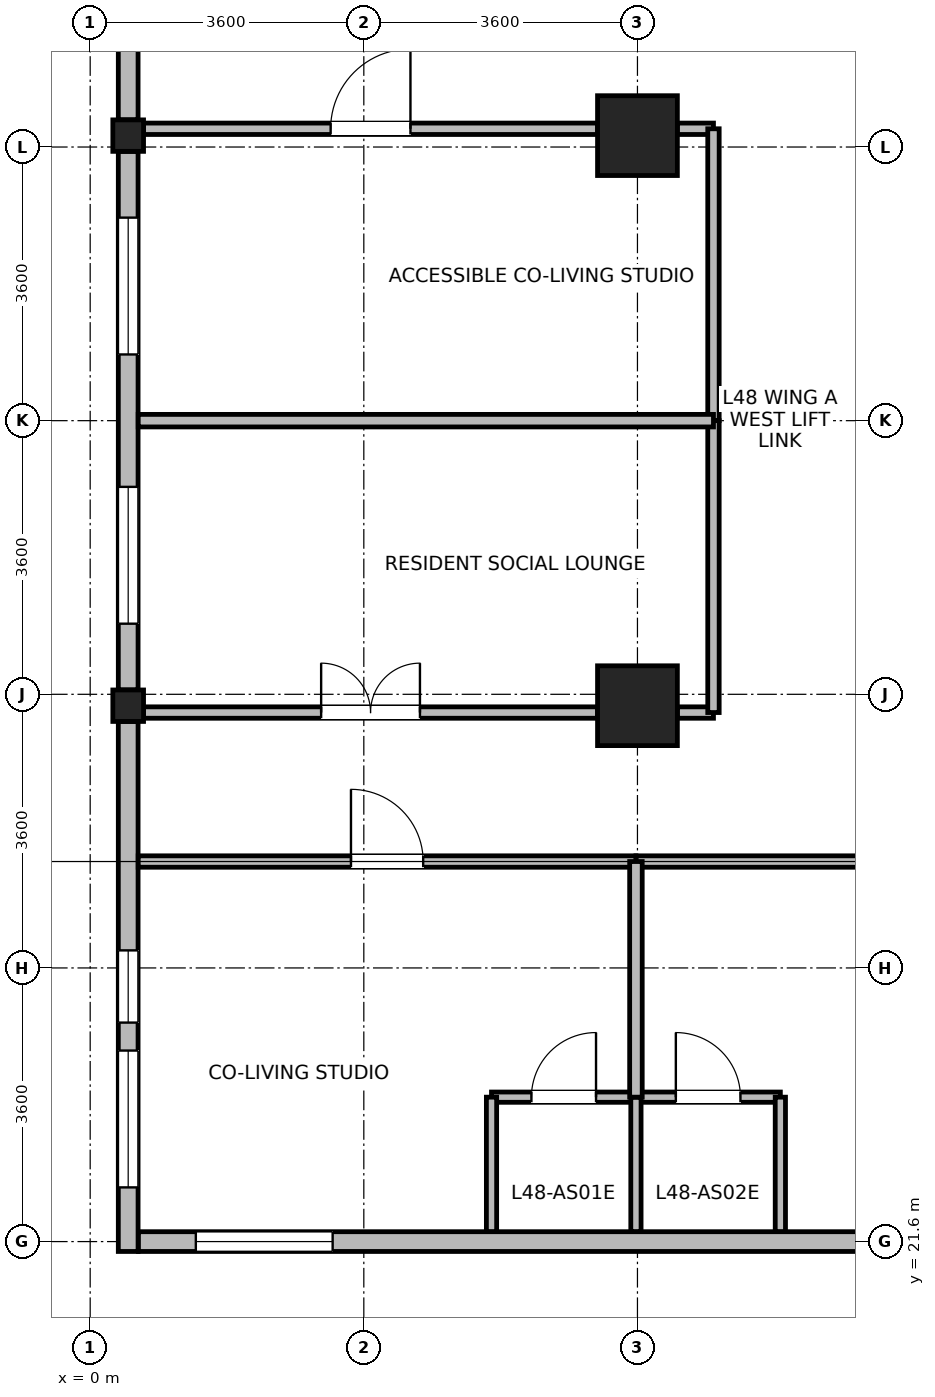
"""IFC4 building model, lengths in metres.
Left out: names, types, materials, properties, quantities, classifications, styles, units other than length and angle.
Written with IfcOpenShell. Run it as: python <this file> out.ifc"""

import sys

from ifc_helpers import new_model, si_unit, direction, frame, frame_2d, origin, origin_2d, place, context, subcontext, project, spatial, rectangle, i_section, extrude, source, transform, mapped, element, fill, save


model = new_model("IFC4")
c1 = context("Model", 3, precision=1e-05, world=origin(), true_north=direction((0.0, 1.0)))
c2 = subcontext(c1, "Body", "Model", "MODEL_VIEW")
j1 = project(units=[si_unit("LENGTHUNIT", "METRE"), si_unit("PLANEANGLEUNIT", "RADIAN")], contexts=[c1])
p1 = place(None, origin())
s1 = spatial("IfcSite", under=j1, at=p1, CompositionType="ELEMENT")
p2 = place(p1, origin())
s2 = spatial("IfcBuilding", under=s1, at=p2, CompositionType="ELEMENT")
p3 = place(p2, frame((0.0, 0.0, 188.3)))
s3 = spatial("IfcBuildingStorey", under=s2, at=p3, CompositionType="ELEMENT", Elevation=188.3)
m1 = source(origin(), c2, "Body", "SweptSolid", [
    extrude(rectangle(XDim=1.05, YDim=1.05, at=origin_2d()), origin(), (0.0, 0.0, 1.0), 3.7),
])
for number, where, z_axis, x_axis in (
    (1, (7.2, 28.65, 0.0), (0.0, 0.0, 1.0), (1.0, 0.0, 0.0)),
    (2, (7.2, 36.15, 0.0), (0.0, 0.0, 1.0), (1.0, 0.0, 0.0)),
):
    element("IfcColumn", number, at=place(p3, frame(where, z_axis=z_axis, x_axis=x_axis)), inside=s3, PredefinedType="COLUMN", context=c2, shape_type="MappedRepresentation", body=[
        mapped(m1, transform((0.0, 0.0, 0.0), x_axis=(1.0, 0.0, 0.0), y_axis=(0.0, 1.0, 0.0), z_axis=(0.0, 0.0, 1.0), scale=1.0)),
    ])
m2 = source(origin(), c2, "Body", "SweptSolid", [
    extrude(i_section(OverallWidth=0.404, OverallDepth=0.414, WebThickness=0.021, FlangeThickness=0.028, FilletRadius=0.015, at=origin_2d()), origin(), (0.0, 0.0, 1.0), 3.7),
])
for number, where, z_axis, x_axis in (
    (3, (0.5, 28.65, 0.0), (0.0, 0.0, 1.0), (1.0, 0.0, 0.0)),
    (4, (0.5, 36.15, 0.0), (0.0, 0.0, 1.0), (1.0, 0.0, 0.0)),
):
    element("IfcColumn", number, at=place(p3, frame(where, z_axis=z_axis, x_axis=x_axis)), inside=s3, PredefinedType="COLUMN", context=c2, shape_type="MappedRepresentation", body=[
        mapped(m2, transform((0.0, 0.0, 0.0), x_axis=(1.0, 0.0, 0.0), y_axis=(0.0, 1.0, 0.0), z_axis=(0.0, 0.0, 1.0), scale=1.0)),
    ])
p4 = place(p3, frame((0.5, 36.358, 0.0), z_axis=(0.0, 0.0, 1.0), x_axis=(0.0, 1.0, 0.0)))
e5 = element("IfcWall", 5, at=p4, inside=s3, PredefinedType="STANDARD", context=c2, shape_type="SweptSolid", body=[
    extrude(rectangle(XDim=6.972, YDim=0.26, at=frame_2d((3.486, 0.0))), origin(), (0.0, 0.0, 1.0), 3.32),
])
p5 = place(p4, frame((4.329, 0.0, 0.85)))
e6 = element("IfcOpeningElement", 6, at=p5, cuts=e5, PredefinedType="OPENING", context=c2, shape_type="SweptSolid", body=[
    extrude(rectangle(XDim=1.8, YDim=1.85, at=frame_2d((0.9, 0.925))), frame((0.0, 0.14, 0.0), z_axis=(0.0, -1.0, 0.0), x_axis=(1.0, 0.0, 0.0)), (0.0, 0.0, 1.0), 0.28),
])
p6 = place(p4, frame((3.011, 0.0, 0.85)))
e7 = element("IfcOpeningElement", 7, at=p6, cuts=e5, PredefinedType="OPENING", context=c2, shape_type="SweptSolid", body=[
    extrude(rectangle(XDim=0.95, YDim=1.75, at=frame_2d((0.475, 0.875))), frame((0.0, 0.14, 0.0), z_axis=(0.0, -1.0, 0.0), x_axis=(1.0, 0.0, 0.0)), (0.0, 0.0, 1.0), 0.28),
])
p7 = place(p3, frame((0.5, 28.858, 0.0), z_axis=(0.0, 0.0, 1.0), x_axis=(0.0, 1.0, 0.0)))
e8 = element("IfcWall", 8, at=p7, inside=s3, PredefinedType="STANDARD", context=c2, shape_type="SweptSolid", body=[
    extrude(rectangle(XDim=7.084, YDim=0.26, at=frame_2d((3.542, 0.0))), origin(), (0.0, 0.0, 1.0), 2.87),
])
p8 = place(p7, frame((0.871, 0.0, 0.85)))
e9 = element("IfcOpeningElement", 9, at=p8, cuts=e8, PredefinedType="OPENING", context=c2, shape_type="SweptSolid", body=[
    extrude(rectangle(XDim=1.8, YDim=1.85, at=frame_2d((0.9, 0.925))), frame((0.0, 0.14, 0.0), z_axis=(0.0, -1.0, 0.0), x_axis=(1.0, 0.0, 0.0)), (0.0, 0.0, 1.0), 0.28),
])
p9 = place(p7, frame((4.413, 0.0, 0.85)))
e10 = element("IfcOpeningElement", 10, at=p9, cuts=e8, PredefinedType="OPENING", context=c2, shape_type="SweptSolid", body=[
    extrude(rectangle(XDim=1.8, YDim=1.85, at=frame_2d((0.9, 0.925))), frame((0.0, 0.14, 0.0), z_axis=(0.0, -1.0, 0.0), x_axis=(1.0, 0.0, 0.0)), (0.0, 0.0, 1.0), 0.28),
])
p10 = place(p3, frame((0.5, 21.47, 0.0), z_axis=(0.0, 0.0, 1.0), x_axis=(0.0, 1.0, 0.0)))
e11 = element("IfcWall", 11, at=p10, inside=s3, PredefinedType="STANDARD", context=c2, shape_type="SweptSolid", body=[
    extrude(rectangle(XDim=6.972, YDim=0.26, at=frame_2d((3.486, 0.0))), origin(), (0.0, 0.0, 1.0), 3.32),
])
p11 = place(p10, frame((0.843, 0.0, 0.85)))
e12 = element("IfcOpeningElement", 12, at=p11, cuts=e11, PredefinedType="OPENING", context=c2, shape_type="SweptSolid", body=[
    extrude(rectangle(XDim=1.8, YDim=1.85, at=frame_2d((0.9, 0.925))), frame((0.0, 0.14, 0.0), z_axis=(0.0, -1.0, 0.0), x_axis=(1.0, 0.0, 0.0)), (0.0, 0.0, 1.0), 0.28),
])
p12 = place(p10, frame((3.011, 0.0, 0.85)))
e13 = element("IfcOpeningElement", 13, at=p12, cuts=e11, PredefinedType="OPENING", context=c2, shape_type="SweptSolid", body=[
    extrude(rectangle(XDim=0.95, YDim=1.75, at=frame_2d((0.475, 0.875))), frame((0.0, 0.14, 0.0), z_axis=(0.0, -1.0, 0.0), x_axis=(1.0, 0.0, 0.0)), (0.0, 0.0, 1.0), 0.28),
])
p13 = place(p3, frame((13.874, 21.6, 0.0), z_axis=(0.0, 0.0, 1.0), x_axis=(-1.0, 0.0, 0.0)))
e14 = element("IfcWall", 14, at=p13, inside=s3, PredefinedType="STANDARD", context=c2, shape_type="SweptSolid", body=[
    extrude(rectangle(XDim=13.239, YDim=0.26, at=frame_2d((6.62, 0.0))), origin(), (0.0, 0.0, 1.0), 3.32),
])
p14 = place(p13, frame((0.755, 0.0, 0.85)))
e15 = element("IfcOpeningElement", 15, at=p14, cuts=e14, PredefinedType="OPENING", context=c2, shape_type="SweptSolid", body=[
    extrude(rectangle(XDim=1.8, YDim=1.85, at=frame_2d((0.9, 0.925))), frame((0.0, 0.14, 0.0), z_axis=(0.0, -1.0, 0.0), x_axis=(1.0, 0.0, 0.0)), (0.0, 0.0, 1.0), 0.28),
])
p15 = place(p13, frame((10.684, 0.0, 0.85)))
e16 = element("IfcOpeningElement", 16, at=p15, cuts=e14, PredefinedType="OPENING", context=c2, shape_type="SweptSolid", body=[
    extrude(rectangle(XDim=1.8, YDim=1.85, at=frame_2d((0.9, 0.925))), frame((0.0, 0.14, 0.0), z_axis=(0.0, -1.0, 0.0), x_axis=(1.0, 0.0, 0.0)), (0.0, 0.0, 1.0), 0.28),
])
p16 = place(p3, frame((7.18, 23.5, 0.0), z_axis=(0.0, 0.0, 1.0), x_axis=(1.0, 0.0, 0.0)))
e17 = element("IfcWall", 17, at=p16, inside=s3, PredefinedType="PARTITIONING", context=c2, shape_type="SweptSolid", body=[
    extrude(rectangle(XDim=1.9, YDim=0.135, at=frame_2d((0.95, 0.0))), origin(), (0.0, 0.0, 1.0), 3.32),
])
p17 = place(p16, frame((0.525, 0.0, 0.0)))
e18 = element("IfcOpeningElement", 18, at=p17, cuts=e17, PredefinedType="OPENING", context=c2, shape_type="SweptSolid", body=[
    extrude(rectangle(XDim=0.85, YDim=2.04, at=frame_2d((0.425, 1.02))), frame((0.0, 0.078, 0.0), z_axis=(0.0, -1.0, 0.0), x_axis=(1.0, 0.0, 0.0)), (0.0, 0.0, 1.0), 0.155),
])
p18 = place(p3, frame((5.28, 23.5, 0.0), z_axis=(0.0, 0.0, 1.0), x_axis=(1.0, 0.0, 0.0)))
e19 = element("IfcWall", 19, at=p18, inside=s3, PredefinedType="PARTITIONING", context=c2, shape_type="SweptSolid", body=[
    extrude(rectangle(XDim=1.9, YDim=0.135, at=frame_2d((0.95, 0.0))), origin(), (0.0, 0.0, 1.0), 3.32),
])
p19 = place(p18, frame((0.525, 0.0, 0.0)))
e20 = element("IfcOpeningElement", 20, at=p19, cuts=e19, PredefinedType="OPENING", context=c2, shape_type="SweptSolid", body=[
    extrude(rectangle(XDim=0.85, YDim=2.04, at=frame_2d((0.425, 1.02))), frame((0.0, 0.078, 0.0), z_axis=(0.0, -1.0, 0.0), x_axis=(1.0, 0.0, 0.0)), (0.0, 0.0, 1.0), 0.155),
])
for number, where, z_axis, x_axis in (
    (21, (5.28, 21.732, 0.0), (0.0, 0.0, 1.0), (0.0, 1.0, 0.0)),
    (22, (7.18, 21.732, 0.0), (0.0, 0.0, 1.0), (0.0, 1.0, 0.0)),
    (23, (9.08, 21.732, 0.0), (0.0, 0.0, 1.0), (0.0, 1.0, 0.0)),
):
    element("IfcWall", number, at=place(p3, frame(where, z_axis=z_axis, x_axis=x_axis)), inside=s3, PredefinedType="PARTITIONING", context=c2, shape_type="SweptSolid", body=[
        extrude(rectangle(XDim=1.768, YDim=0.135, at=frame_2d((0.884, 0.0))), origin(), (0.0, 0.0, 1.0), 3.32),
    ])
p20 = place(p3, frame((7.18, 26.6, 0.0), z_axis=(0.0, 0.0, 1.0), x_axis=(1.0, 0.0, 0.0)))
e24 = element("IfcWall", 24, at=p20, inside=s3, PredefinedType="PARTITIONING", context=c2, shape_type="SweptSolid", body=[
    extrude(rectangle(XDim=7.88, YDim=0.15, at=frame_2d((3.94, 0.0))), origin(), (0.0, 0.0, 1.0), 3.32),
])
p21 = place(p20, frame((3.415, 0.0, 0.0)))
e25 = element("IfcOpeningElement", 25, at=p21, cuts=e24, PredefinedType="OPENING", context=c2, shape_type="SweptSolid", body=[
    extrude(rectangle(XDim=1.05, YDim=2.12, at=frame_2d((0.525, 1.06))), frame((0.0, 0.085, 0.0), z_axis=(0.0, -1.0, 0.0), x_axis=(1.0, 0.0, 0.0)), (0.0, 0.0, 1.0), 0.17),
])
p22 = place(p3, frame((0.702, 28.56, 0.0), z_axis=(0.0, 0.0, 1.0), x_axis=(1.0, 0.0, 0.0)))
e26 = element("IfcWall", 26, at=p22, inside=s3, PredefinedType="PARTITIONING", context=c2, shape_type="SweptSolid", body=[
    extrude(rectangle(XDim=5.973, YDim=0.15, at=frame_2d((2.987, 0.0))), origin(), (0.0, 0.0, 1.0), 2.72),
])
p23 = place(p22, frame((2.336, 0.0, 0.0)))
e27 = element("IfcOpeningElement", 27, at=p23, cuts=e26, PredefinedType="OPENING", context=c2, shape_type="SweptSolid", body=[
    extrude(rectangle(XDim=1.3, YDim=2.12, at=frame_2d((0.65, 1.06))), frame((0.0, 0.085, 0.0), z_axis=(0.0, -1.0, 0.0), x_axis=(1.0, 0.0, 0.0)), (0.0, 0.0, 1.0), 0.17),
])
p24 = place(p3, frame((7.725, 28.56, 0.0), z_axis=(0.0, 0.0, 1.0), x_axis=(1.0, 0.0, 0.0)))
e28 = element("IfcWall", 28, at=p24, inside=s3, PredefinedType="PARTITIONING", context=c2, shape_type="SweptSolid", body=[
    extrude(rectangle(XDim=0.475, YDim=0.15, at=frame_2d((0.237, 0.0))), origin(), (0.0, 0.0, 1.0), 2.72),
])
p25 = place(p3, frame((0.702, 36.24, 0.0), z_axis=(0.0, 0.0, 1.0), x_axis=(1.0, 0.0, 0.0)))
e29 = element("IfcWall", 29, at=p25, inside=s3, PredefinedType="PARTITIONING", context=c2, shape_type="SweptSolid", body=[
    extrude(rectangle(XDim=5.973, YDim=0.15, at=frame_2d((2.987, 0.0))), origin(), (0.0, 0.0, 1.0), 2.72),
])
p26 = place(p25, frame((2.461, 0.0, 0.0)))
e30 = element("IfcOpeningElement", 30, at=p26, cuts=e29, PredefinedType="OPENING", context=c2, shape_type="SweptSolid", body=[
    extrude(rectangle(XDim=1.05, YDim=2.12, at=frame_2d((0.525, 1.06))), frame((0.0, 0.085, 0.0), z_axis=(0.0, -1.0, 0.0), x_axis=(1.0, 0.0, 0.0)), (0.0, 0.0, 1.0), 0.17),
])
p27 = place(p3, frame((7.725, 36.24, 0.0), z_axis=(0.0, 0.0, 1.0), x_axis=(1.0, 0.0, 0.0)))
e31 = element("IfcWall", 31, at=p27, inside=s3, PredefinedType="PARTITIONING", context=c2, shape_type="SweptSolid", body=[
    extrude(rectangle(XDim=0.475, YDim=0.15, at=frame_2d((0.237, 0.0))), origin(), (0.0, 0.0, 1.0), 2.72),
])
p28 = place(p3, frame((0.632, 26.6, 0.0), z_axis=(0.0, 0.0, 1.0), x_axis=(1.0, 0.0, 0.0)))
e32 = element("IfcWall", 32, at=p28, inside=s3, PredefinedType="PARTITIONING", context=c2, shape_type="SweptSolid", body=[
    extrude(rectangle(XDim=6.548, YDim=0.15, at=frame_2d((3.274, 0.0))), origin(), (0.0, 0.0, 1.0), 3.32),
])
p29 = place(p28, frame((2.799, 0.0, 0.0)))
e33 = element("IfcOpeningElement", 33, at=p29, cuts=e32, PredefinedType="OPENING", context=c2, shape_type="SweptSolid", body=[
    extrude(rectangle(XDim=0.95, YDim=2.1, at=frame_2d((0.475, 1.05))), frame((0.0, 0.085, 0.0), z_axis=(0.0, -1.0, 0.0), x_axis=(1.0, 0.0, 0.0)), (0.0, 0.0, 1.0), 0.17),
])
p30 = place(p3, frame((8.2, 32.4, 0.0), z_axis=(0.0, 0.0, 1.0), x_axis=(0.0, 1.0, 0.0)))
e34 = element("IfcWall", 34, at=p30, inside=s3, PredefinedType="PARTITIONING", context=c2, shape_type="SweptSolid", body=[
    extrude(rectangle(XDim=3.84, YDim=0.15, at=frame_2d((1.92, 0.0))), origin(), (0.0, 0.0, 1.0), 3.32),
])
p31 = place(p3, frame((8.2, 28.56, 0.0), z_axis=(0.0, 0.0, 1.0), x_axis=(0.0, 1.0, 0.0)))
e35 = element("IfcWall", 35, at=p31, inside=s3, PredefinedType="PARTITIONING", context=c2, shape_type="SweptSolid", body=[
    extrude(rectangle(XDim=3.84, YDim=0.15, at=frame_2d((1.92, 0.0))), origin(), (0.0, 0.0, 1.0), 3.32),
])
p32 = place(p3, frame((0.632, 32.4, 0.0), z_axis=(0.0, 0.0, 1.0), x_axis=(1.0, 0.0, 0.0)))
e36 = element("IfcWall", 36, at=p32, inside=s3, PredefinedType="PARTITIONING", context=c2, shape_type="SweptSolid", body=[
    extrude(rectangle(XDim=7.568, YDim=0.165, at=frame_2d((3.784, 0.0))), origin(), (0.0, 0.0, 1.0), 3.32),
])
p33 = place(p3, frame((7.18, 23.5, 0.0), z_axis=(0.0, 0.0, 1.0), x_axis=(0.0, 1.0, 0.0)))
e37 = element("IfcWall", 37, at=p33, inside=s3, PredefinedType="PARTITIONING", context=c2, shape_type="SweptSolid", body=[
    extrude(rectangle(XDim=3.1, YDim=0.165, at=frame_2d((1.55, 0.0))), origin(), (0.0, 0.0, 1.0), 3.32),
])
p34 = place(p8, origin())
e38 = element("IfcWindow", 38, at=p34, inside=s3, PartitioningType="SINGLE_PANEL", PredefinedType="WINDOW", context=c2, shape_type="SweptSolid", body=[
    extrude(rectangle(XDim=1.8, YDim=1.85, at=frame_2d((0.9, 0.925))), frame((0.0, 0.03, 0.0), z_axis=(0.0, -1.0, 0.0), x_axis=(1.0, 0.0, 0.0)), (0.0, 0.0, 1.0), 0.06),
])
fill(e9, e38)
p35 = place(p9, origin())
e39 = element("IfcWindow", 39, at=p35, inside=s3, PartitioningType="SINGLE_PANEL", PredefinedType="WINDOW", context=c2, shape_type="SweptSolid", body=[
    extrude(rectangle(XDim=1.8, YDim=1.85, at=frame_2d((0.9, 0.925))), frame((0.0, 0.03, 0.0), z_axis=(0.0, -1.0, 0.0), x_axis=(1.0, 0.0, 0.0)), (0.0, 0.0, 1.0), 0.06),
])
fill(e10, e39)
p36 = place(p11, origin())
e40 = element("IfcWindow", 40, at=p36, inside=s3, PartitioningType="SINGLE_PANEL", PredefinedType="WINDOW", context=c2, shape_type="SweptSolid", body=[
    extrude(rectangle(XDim=1.8, YDim=1.85, at=frame_2d((0.9, 0.925))), frame((0.0, 0.03, 0.0), z_axis=(0.0, -1.0, 0.0), x_axis=(1.0, 0.0, 0.0)), (0.0, 0.0, 1.0), 0.06),
])
fill(e12, e40)
p37 = place(p12, origin())
e41 = element("IfcWindow", 41, at=p37, inside=s3, PartitioningType="SINGLE_PANEL", PredefinedType="WINDOW", context=c2, shape_type="SweptSolid", body=[
    extrude(rectangle(XDim=0.95, YDim=1.75, at=frame_2d((0.475, 0.875))), frame((0.0, 0.03, 0.0), z_axis=(0.0, -1.0, 0.0), x_axis=(1.0, 0.0, 0.0)), (0.0, 0.0, 1.0), 0.06),
])
fill(e13, e41)
p38 = place(p15, origin())
e42 = element("IfcWindow", 42, at=p38, inside=s3, PartitioningType="SINGLE_PANEL", PredefinedType="WINDOW", context=c2, shape_type="SweptSolid", body=[
    extrude(rectangle(XDim=1.8, YDim=1.85, at=frame_2d((0.9, 0.925))), frame((0.0, 0.03, 0.0), z_axis=(0.0, -1.0, 0.0), x_axis=(1.0, 0.0, 0.0)), (0.0, 0.0, 1.0), 0.06),
])
fill(e16, e42)
p39 = place(p17, origin())
e43 = element("IfcDoor", 43, at=p39, inside=s3, OperationType="SINGLE_SWING_LEFT", PredefinedType="DOOR", context=c2, shape_type="SweptSolid", body=[
    extrude(rectangle(XDim=0.85, YDim=2.04, at=frame_2d((0.425, 1.02))), frame((0.0, 0.025, 0.0), z_axis=(0.0, -1.0, 0.0), x_axis=(1.0, 0.0, 0.0)), (0.0, 0.0, 1.0), 0.05),
])
fill(e18, e43)
p40 = place(p19, origin())
e44 = element("IfcDoor", 44, at=p40, inside=s3, OperationType="SINGLE_SWING_RIGHT", PredefinedType="DOOR", context=c2, shape_type="SweptSolid", body=[
    extrude(rectangle(XDim=0.85, YDim=2.04, at=frame_2d((0.425, 1.02))), frame((0.0, 0.025, 0.0), z_axis=(0.0, -1.0, 0.0), x_axis=(1.0, 0.0, 0.0)), (0.0, 0.0, 1.0), 0.05),
])
fill(e20, e44)
p41 = place(p23, origin())
e45 = element("IfcDoor", 45, at=p41, inside=s3, OperationType="DOUBLE_DOOR_SINGLE_SWING", PredefinedType="DOOR", context=c2, shape_type="SweptSolid", body=[
    extrude(rectangle(XDim=1.3, YDim=2.12, at=frame_2d((0.65, 1.06))), frame((0.0, 0.025, 0.0), z_axis=(0.0, -1.0, 0.0), x_axis=(1.0, 0.0, 0.0)), (0.0, 0.0, 1.0), 0.05),
])
fill(e27, e45)
p42 = place(p26, origin())
e46 = element("IfcDoor", 46, at=p42, inside=s3, OperationType="SINGLE_SWING_RIGHT", PredefinedType="DOOR", context=c2, shape_type="SweptSolid", body=[
    extrude(rectangle(XDim=1.05, YDim=2.12, at=frame_2d((0.525, 1.06))), frame((0.0, 0.025, 0.0), z_axis=(0.0, -1.0, 0.0), x_axis=(1.0, 0.0, 0.0)), (0.0, 0.0, 1.0), 0.05),
])
fill(e30, e46)
p43 = place(p29, origin())
e47 = element("IfcDoor", 47, at=p43, inside=s3, OperationType="SINGLE_SWING_LEFT", PredefinedType="DOOR", context=c2, shape_type="SweptSolid", body=[
    extrude(rectangle(XDim=0.95, YDim=2.1, at=frame_2d((0.475, 1.05))), frame((0.0, 0.025, 0.0), z_axis=(0.0, -1.0, 0.0), x_axis=(1.0, 0.0, 0.0)), (0.0, 0.0, 1.0), 0.05),
])
fill(e33, e47)
save(model, sys.argv[1])
